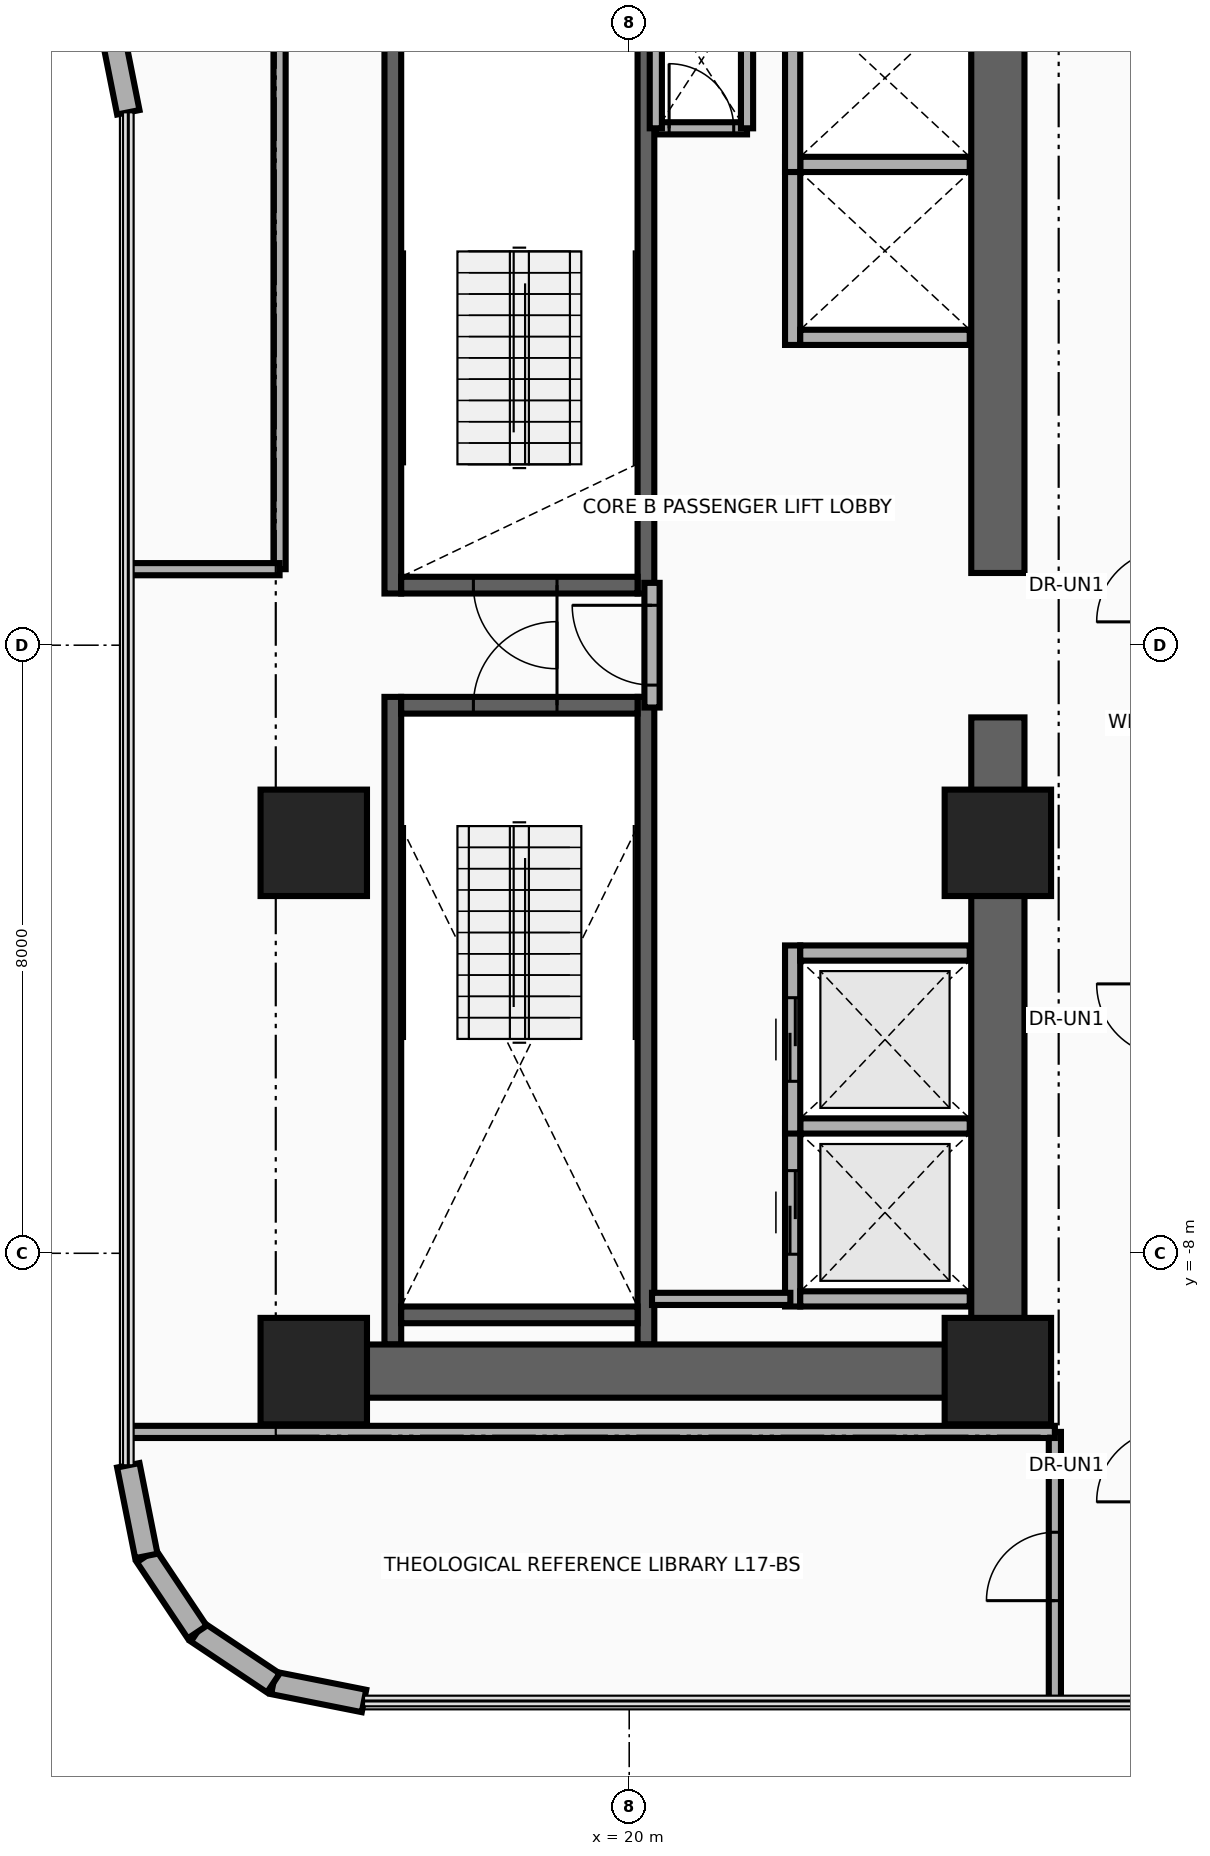
"""IFC4 building model, lengths in metres.
Left out: names, types, materials, properties, quantities, classifications, styles, units other than length and angle.
Written with IfcOpenShell. Run it as: python <this file> out.ifc"""

import sys

from ifc_helpers import new_model, si_unit, direction, frame, frame_2d, origin, origin_2d, place, context, subcontext, project, spatial, rectangle, extrude, source, transform, mapped, element, fill, save


model = new_model("IFC4")
c1 = context("Model", 3, precision=1e-05, world=origin(), true_north=direction((0.0, 1.0)))
c2 = subcontext(c1, "Body", "Model", "MODEL_VIEW")
j1 = project(units=[si_unit("LENGTHUNIT", "METRE"), si_unit("PLANEANGLEUNIT", "RADIAN")], contexts=[c1])
p1 = place(None, origin())
s1 = spatial("IfcSite", under=j1, at=p1, CompositionType="ELEMENT")
p2 = place(p1, origin())
s2 = spatial("IfcBuilding", under=s1, at=p2, CompositionType="ELEMENT")
p3 = place(p2, frame((0.0, 0.0, 70.4)))
s3 = spatial("IfcBuildingStorey", under=s2, at=p3, CompositionType="ELEMENT", Elevation=70.4)
for number, where, z_axis, x_axis in (
    (1, (16.89, 0.68, 0.0), (0.0, 0.0, 1.0), (0.0, 1.0, 0.0)),
    (2, (20.22, 0.68, 0.0), (0.0, 0.0, 1.0), (0.0, 1.0, 0.0)),
):
    element("IfcWall", number, at=place(p3, frame(where, z_axis=z_axis, x_axis=x_axis)), inside=s3, PredefinedType="SHEAR", context=c2, shape_type="SweptSolid", body=[
        extrude(rectangle(XDim=8.52, YDim=0.22, at=frame_2d((4.26, 0.0))), origin(), (0.0, 0.0, 1.0), 3.46),
    ])
p4 = place(p3, frame((17.0, 0.79, 0.0), z_axis=(0.0, 0.0, 1.0), x_axis=(1.0, 0.0, 0.0)))
e3 = element("IfcWall", 3, at=p4, inside=s3, PredefinedType="SHEAR", context=c2, shape_type="SweptSolid", body=[
    extrude(rectangle(XDim=3.11, YDim=0.22, at=frame_2d((1.555, 0.0))), origin(), (0.0, 0.0, 1.0), 3.46),
])
p5 = place(p4, frame((0.95, 0.0, 0.0)))
e4 = element("IfcOpeningElement", 4, at=p5, cuts=e3, PredefinedType="OPENING", context=c2, shape_type="SweptSolid", body=[
    extrude(rectangle(XDim=1.1, YDim=2.15, at=frame_2d((0.55, 1.075))), frame((0.0, 0.125, 0.0), z_axis=(0.0, -1.0, 0.0), x_axis=(1.0, 0.0, 0.0)), (0.0, 0.0, 1.0), 0.25),
])
for number, where, z_axis, x_axis in (
    (5, (16.89, -9.2, 0.0), (0.0, 0.0, 1.0), (0.0, 1.0, 0.0)),
    (6, (20.22, -9.2, 0.0), (0.0, 0.0, 1.0), (0.0, 1.0, 0.0)),
):
    element("IfcWall", number, at=place(p3, frame(where, z_axis=z_axis, x_axis=x_axis)), inside=s3, PredefinedType="SHEAR", context=c2, shape_type="SweptSolid", body=[
        extrude(rectangle(XDim=8.52, YDim=0.22, at=frame_2d((4.26, 0.0))), origin(), (0.0, 0.0, 1.0), 3.46),
    ])
p6 = place(p3, frame((17.0, -8.81, 0.0), z_axis=(0.0, 0.0, 1.0), x_axis=(1.0, 0.0, 0.0)))
e7 = element("IfcWall", 7, at=p6, inside=s3, PredefinedType="SHEAR", context=c2, shape_type="SweptSolid", body=[
    extrude(rectangle(XDim=3.11, YDim=0.22, at=frame_2d((1.555, 0.0))), origin(), (0.0, 0.0, 1.0), 3.46),
])
p7 = place(p3, frame((17.0, -0.79, 0.0), z_axis=(0.0, 0.0, 1.0), x_axis=(1.0, 0.0, 0.0)))
e8 = element("IfcWall", 8, at=p7, inside=s3, PredefinedType="SHEAR", context=c2, shape_type="SweptSolid", body=[
    extrude(rectangle(XDim=3.11, YDim=0.22, at=frame_2d((1.555, 0.0))), origin(), (0.0, 0.0, 1.0), 3.46),
])
p8 = place(p7, frame((0.95, 0.0, 0.0)))
e9 = element("IfcOpeningElement", 9, at=p8, cuts=e8, PredefinedType="OPENING", context=c2, shape_type="SweptSolid", body=[
    extrude(rectangle(XDim=1.1, YDim=2.15, at=frame_2d((0.55, 1.075))), frame((0.0, 0.125, 0.0), z_axis=(0.0, -1.0, 0.0), x_axis=(1.0, 0.0, 0.0)), (0.0, 0.0, 1.0), 0.25),
])
for number, where, z_axis, x_axis in (
    (10, (24.85, -9.9, 0.0), (0.0, 0.0, 1.0), (0.0, 1.0, 0.0)),
    (11, (24.85, 0.95, 0.0), (0.0, 0.0, 1.0), (0.0, 1.0, 0.0)),
):
    element("IfcWall", number, at=place(p3, frame(where, z_axis=z_axis, x_axis=x_axis)), inside=s3, PredefinedType="SHEAR", context=c2, shape_type="SweptSolid", body=[
        extrude(rectangle(XDim=8.95, YDim=0.7, at=frame_2d((4.475, 0.0))), origin(), (0.0, 0.0, 1.0), 3.46),
    ])
p9 = place(p3, frame((15.85, -9.55, 0.0), z_axis=(0.0, 0.0, 1.0), x_axis=(1.0, 0.0, 0.0)))
e12 = element("IfcWall", 12, at=p9, inside=s3, PredefinedType="SHEAR", context=c2, shape_type="SweptSolid", body=[
    extrude(rectangle(XDim=9.0, YDim=0.7, at=frame_2d((4.5, 0.0))), origin(), (0.0, 0.0, 1.0), 3.46),
])
m1 = source(origin(), c2, "Body", "SweptSolid", [
    extrude(rectangle(XDim=1.4, YDim=1.4, at=origin_2d()), origin(), (0.0, 0.0, 1.0), 3.7),
])
for number, where, z_axis, x_axis in (
    (13, (15.85, -9.55, 0.0), (0.0, 0.0, 1.0), (1.0, 0.0, 0.0)),
    (14, (24.85, -9.55, 0.0), (0.0, 0.0, 1.0), (1.0, 0.0, 0.0)),
    (15, (15.85, -2.6, 0.0), (0.0, 0.0, 1.0), (1.0, 0.0, 0.0)),
    (16, (24.85, -2.6, 0.0), (0.0, 0.0, 1.0), (1.0, 0.0, 0.0)),
):
    element("IfcColumn", number, at=place(p3, frame(where, z_axis=z_axis, x_axis=x_axis)), inside=s3, PredefinedType="COLUMN", context=c2, shape_type="MappedRepresentation", body=[
        mapped(m1, transform((0.0, 0.0, 0.0), x_axis=(1.0, 0.0, 0.0), y_axis=(0.0, 1.0, 0.0), z_axis=(0.0, 0.0, 1.0), scale=1.0)),
    ])
p10 = place(p3, frame((16.511, -13.89, 0.0), z_axis=(0.0, 0.0, 1.0), x_axis=(-0.980804027463, 0.194996050505, 0.0)))
e17 = element("IfcWall", 17, at=p10, inside=s3, PredefinedType="SOLIDWALL", context=c2, shape_type="SweptSolid", body=[
    extrude(rectangle(XDim=1.216, YDim=0.3, at=frame_2d((0.608, 0.0))), origin(), (0.0, 0.0, 1.0), 3.46),
])
for number, where, z_axis, x_axis in (
    (18, (15.318, -13.653, 0.0), (0.0, 0.0, 1.0), (-0.831, 0.556, 0.0)),
    (19, (14.317, -12.983, 0.0), (0.0, 0.0, 1.0), (-0.556, 0.831, 0.0)),
):
    element("IfcWall", number, at=place(p3, frame(where, z_axis=z_axis, x_axis=x_axis)), inside=s3, PredefinedType="SOLIDWALL", context=c2, shape_type="SweptSolid", body=[
        extrude(rectangle(XDim=1.205, YDim=0.3, at=frame_2d((0.603, 0.0))), origin(), (0.0, 0.0, 1.0), 3.46),
    ])
p11 = place(p3, frame((13.647, -11.982, 0.0), z_axis=(0.0, 0.0, 1.0), x_axis=(-0.195189223115, 0.980765602568, 0.0)))
e20 = element("IfcWall", 20, at=p11, inside=s3, PredefinedType="SOLIDWALL", context=c2, shape_type="SweptSolid", body=[
    extrude(rectangle(XDim=1.216, YDim=0.3, at=frame_2d((0.608, 0.0))), origin(), (0.0, 0.0, 1.0), 3.46),
])
p12 = place(p3, frame((13.41, 7.011, 0.0), z_axis=(0.0, 0.0, 1.0), x_axis=(-0.195090163074, 0.980785312019, 0.0)))
e21 = element("IfcWall", 21, at=p12, inside=s3, PredefinedType="SOLIDWALL", context=c2, shape_type="SweptSolid", body=[
    extrude(rectangle(XDim=1.281, YDim=0.3, at=frame_2d((0.641, 0.0))), origin(), (0.0, 0.0, 1.0), 3.46),
])
p13 = place(p3, frame((22.15, -8.7, 0.0), z_axis=(0.0, 0.0, 1.0), x_axis=(0.0, 1.0, 0.0)))
e22 = element("IfcWall", 22, at=p13, inside=s3, PredefinedType="MOVABLE", context=c2, shape_type="SweptSolid", body=[
    extrude(rectangle(XDim=2.475, YDim=0.2, at=frame_2d((1.237, 0.0))), origin(), (0.0, 0.0, 1.0), 3.46),
])
p14 = place(p13, frame((0.688, 0.0, 0.0)))
e23 = element("IfcOpeningElement", 23, at=p14, cuts=e22, PredefinedType="OPENING", context=c2, shape_type="SweptSolid", body=[
    extrude(rectangle(XDim=1.1, YDim=2.1, at=frame_2d((0.55, 1.05))), frame((0.0, 0.115, 0.0), z_axis=(0.0, -1.0, 0.0), x_axis=(1.0, 0.0, 0.0)), (0.0, 0.0, 1.0), 0.23),
])
for number, where, z_axis, x_axis in (
    (24, (22.25, -8.6, 0.0), (0.0, 0.0, 1.0), (1.0, 0.0, 0.0)),
    (25, (22.25, -6.325, 0.0), (0.0, 0.0, 1.0), (1.0, 0.0, 0.0)),
):
    element("IfcWall", number, at=place(p3, frame(where, z_axis=z_axis, x_axis=x_axis)), inside=s3, PredefinedType="MOVABLE", context=c2, shape_type="SweptSolid", body=[
        extrude(rectangle(XDim=2.23, YDim=0.2, at=frame_2d((1.115, 0.0))), origin(), (0.0, 0.0, 1.0), 3.46),
    ])
p15 = place(p3, frame((22.15, -6.425, 0.0), z_axis=(0.0, 0.0, 1.0), x_axis=(0.0, 1.0, 0.0)))
e26 = element("IfcWall", 26, at=p15, inside=s3, PredefinedType="MOVABLE", context=c2, shape_type="SweptSolid", body=[
    extrude(rectangle(XDim=2.475, YDim=0.2, at=frame_2d((1.238, 0.0))), origin(), (0.0, 0.0, 1.0), 3.46),
])
p16 = place(p15, frame((0.688, 0.0, 0.0)))
e27 = element("IfcOpeningElement", 27, at=p16, cuts=e26, PredefinedType="OPENING", context=c2, shape_type="SweptSolid", body=[
    extrude(rectangle(XDim=1.1, YDim=2.1, at=frame_2d((0.55, 1.05))), frame((0.0, 0.115, 0.0), z_axis=(0.0, -1.0, 0.0), x_axis=(1.0, 0.0, 0.0)), (0.0, 0.0, 1.0), 0.23),
])
p17 = place(p3, frame((22.25, -4.05, 0.0), z_axis=(0.0, 0.0, 1.0), x_axis=(1.0, 0.0, 0.0)))
e28 = element("IfcWall", 28, at=p17, inside=s3, PredefinedType="MOVABLE", context=c2, shape_type="SweptSolid", body=[
    extrude(rectangle(XDim=2.23, YDim=0.2, at=frame_2d((1.115, 0.0))), origin(), (0.0, 0.0, 1.0), 3.46),
])
p18 = place(p3, frame((22.15, 3.95, 0.0), z_axis=(0.0, 0.0, 1.0), x_axis=(0.0, 1.0, 0.0)))
e29 = element("IfcWall", 29, at=p18, inside=s3, PredefinedType="MOVABLE", context=c2, shape_type="SweptSolid", body=[
    extrude(rectangle(XDim=2.475, YDim=0.2, at=frame_2d((1.238, 0.0))), origin(), (0.0, 0.0, 1.0), 3.46),
])
for number, where, z_axis, x_axis in (
    (30, (22.25, 4.05, 0.0), (0.0, 0.0, 1.0), (1.0, 0.0, 0.0)),
    (31, (22.25, 6.325, 0.0), (0.0, 0.0, 1.0), (1.0, 0.0, 0.0)),
):
    element("IfcWall", number, at=place(p3, frame(where, z_axis=z_axis, x_axis=x_axis)), inside=s3, PredefinedType="MOVABLE", context=c2, shape_type="SweptSolid", body=[
        extrude(rectangle(XDim=2.23, YDim=0.2, at=frame_2d((1.115, 0.0))), origin(), (0.0, 0.0, 1.0), 2.245),
    ])
p19 = place(p3, frame((22.15, 6.225, 0.0), z_axis=(0.0, 0.0, 1.0), x_axis=(0.0, 1.0, 0.0)))
e32 = element("IfcWall", 32, at=p19, inside=s3, PredefinedType="MOVABLE", context=c2, shape_type="SweptSolid", body=[
    extrude(rectangle(XDim=2.475, YDim=0.2, at=frame_2d((1.237, 0.0))), origin(), (0.0, 0.0, 1.0), 3.46),
])
p20 = place(p3, frame((20.3, -0.82, 0.0), z_axis=(0.0, 0.0, 1.0), x_axis=(0.0, 1.0, 0.0)))
e33 = element("IfcWall", 33, at=p20, inside=s3, PredefinedType="PARTITIONING", context=c2, shape_type="SweptSolid", body=[
    extrude(rectangle(XDim=1.64, YDim=0.2, at=frame_2d((0.82, 0.0))), origin(), (0.0, 0.0, 1.0), 3.46),
])
p21 = place(p20, frame((0.295, 0.0, 0.0)))
e34 = element("IfcOpeningElement", 34, at=p21, cuts=e33, PredefinedType="OPENING", context=c2, shape_type="SweptSolid", body=[
    extrude(rectangle(XDim=1.05, YDim=2.15, at=frame_2d((0.525, 1.075))), frame((0.0, 0.115, 0.0), z_axis=(0.0, -1.0, 0.0), x_axis=(1.0, 0.0, 0.0)), (0.0, 0.0, 1.0), 0.23),
])
p22 = place(p3, frame((20.35, 6.8, 0.0), z_axis=(0.0, 0.0, 1.0), x_axis=(1.0, 0.0, 0.0)))
e35 = element("IfcWall", 35, at=p22, inside=s3, PredefinedType="PARTITIONING", context=c2, shape_type="SweptSolid", body=[
    extrude(rectangle(XDim=1.2, YDim=0.16, at=frame_2d((0.6, 0.0))), origin(), (0.0, 0.0, 1.0), 3.46),
])
p23 = place(p22, frame((0.175, 0.0, 0.0)))
e36 = element("IfcOpeningElement", 36, at=p23, cuts=e35, PredefinedType="OPENING", context=c2, shape_type="SweptSolid", body=[
    extrude(rectangle(XDim=0.85, YDim=2.05, at=frame_2d((0.425, 1.025))), frame((0.0, 0.095, 0.0), z_axis=(0.0, -1.0, 0.0), x_axis=(1.0, 0.0, 0.0)), (0.0, 0.0, 1.0), 0.19),
])
for number, where, z_axis, x_axis in (
    (37, (21.55, 6.8, 0.0), (0.0, 0.0, 1.0), (0.0, 1.0, 0.0)),
    (38, (20.35, 6.8, 0.0), (0.0, 0.0, 1.0), (0.0, 1.0, 0.0)),
):
    element("IfcWall", number, at=place(p3, frame(where, z_axis=z_axis, x_axis=x_axis)), inside=s3, PredefinedType="PARTITIONING", context=c2, shape_type="SweptSolid", body=[
        extrude(rectangle(XDim=1.8, YDim=0.16, at=frame_2d((0.9, 0.0))), origin(), (0.0, 0.0, 1.0), 3.46),
    ])
p24 = place(p3, frame((20.3, -8.6, 0.0), z_axis=(0.0, 0.0, 1.0), x_axis=(1.0, 0.0, 0.0)))
e39 = element("IfcWall", 39, at=p24, inside=s3, PredefinedType="PARTITIONING", context=c2, shape_type="SweptSolid", body=[
    extrude(rectangle(XDim=1.82, YDim=0.16, at=frame_2d((0.91, 0.0))), origin(), (0.0, 0.0, 1.0), 3.46),
])
p25 = place(p3, frame((25.6, -13.89, 0.0), z_axis=(0.0, 0.0, 1.0), x_axis=(0.0, 1.0, 0.0)))
e40 = element("IfcWall", 40, at=p25, inside=s3, PredefinedType="PARTITIONING", context=c2, shape_type="SweptSolid", body=[
    extrude(rectangle(XDim=3.54, YDim=0.16, at=frame_2d((1.77, 0.0))), origin(), (0.0, 0.0, 1.0), 3.46),
])
p26 = place(p25, frame((1.32, 0.0, 0.0)))
e41 = element("IfcOpeningElement", 41, at=p26, cuts=e40, PredefinedType="OPENING", context=c2, shape_type="SweptSolid", body=[
    extrude(rectangle(XDim=0.9, YDim=2.1, at=frame_2d((0.45, 1.05))), frame((0.0, 0.095, 0.0), z_axis=(0.0, -1.0, 0.0), x_axis=(1.0, 0.0, 0.0)), (0.0, 0.0, 1.0), 0.19),
])
p27 = place(p3, frame((13.41, -10.35, 0.0), z_axis=(0.0, 0.0, 1.0), x_axis=(1.0, 0.0, 0.0)))
e42 = element("IfcWall", 42, at=p27, inside=s3, PredefinedType="PARTITIONING", context=c2, shape_type="SweptSolid", body=[
    extrude(rectangle(XDim=12.19, YDim=0.16, at=frame_2d((6.095, 0.0))), origin(), (0.0, 0.0, 1.0), 3.46),
])
p28 = place(p3, frame((15.4, 1.0, 0.0), z_axis=(0.0, 0.0, 1.0), x_axis=(0.0, 1.0, 0.0)))
e43 = element("IfcWall", 43, at=p28, inside=s3, PredefinedType="PARTITIONING", context=c2, shape_type="SweptSolid", body=[
    extrude(rectangle(XDim=9.35, YDim=0.16, at=frame_2d((4.675, 0.0))), origin(), (0.0, 0.0, 1.0), 2.245),
])
p29 = place(p3, frame((13.41, 1.0, 0.0), z_axis=(0.0, 0.0, 1.0), x_axis=(1.0, 0.0, 0.0)))
e44 = element("IfcWall", 44, at=p29, inside=s3, PredefinedType="PARTITIONING", context=c2, shape_type="SweptSolid", body=[
    extrude(rectangle(XDim=1.99, YDim=0.16, at=frame_2d((0.995, 0.0))), origin(), (0.0, 0.0, 1.0), 2.245),
])
p30 = place(p14, origin())
e45 = element("IfcDoor", 45, at=p30, inside=s3, OperationType="DOUBLE_DOOR_SLIDING", PredefinedType="DOOR", context=c2, shape_type="SweptSolid", body=[
    extrude(rectangle(XDim=1.1, YDim=2.1, at=frame_2d((0.55, 1.05))), frame((0.0, 0.025, 0.0), z_axis=(0.0, -1.0, 0.0), x_axis=(1.0, 0.0, 0.0)), (0.0, 0.0, 1.0), 0.05),
])
fill(e23, e45)
p31 = place(p16, origin())
e46 = element("IfcDoor", 46, at=p31, inside=s3, OperationType="DOUBLE_DOOR_SLIDING", PredefinedType="DOOR", context=c2, shape_type="SweptSolid", body=[
    extrude(rectangle(XDim=1.1, YDim=2.1, at=frame_2d((0.55, 1.05))), frame((0.0, 0.025, 0.0), z_axis=(0.0, -1.0, 0.0), x_axis=(1.0, 0.0, 0.0)), (0.0, 0.0, 1.0), 0.05),
])
fill(e27, e46)
p32 = place(p21, origin())
e47 = element("IfcDoor", 47, at=p32, inside=s3, OperationType="SINGLE_SWING_RIGHT", PredefinedType="DOOR", context=c2, shape_type="SweptSolid", body=[
    extrude(rectangle(XDim=1.05, YDim=2.15, at=frame_2d((0.525, 1.075))), frame((0.0, 0.025, 0.0), z_axis=(0.0, -1.0, 0.0), x_axis=(1.0, 0.0, 0.0)), (0.0, 0.0, 1.0), 0.05),
])
fill(e34, e47)
p33 = place(p5, frame((1.1, 0.0, 0.0), z_axis=(0.0, 0.0, 1.0), x_axis=(-1.0, 0.0, 0.0)))
e48 = element("IfcDoor", 48, at=p33, inside=s3, OperationType="SINGLE_SWING_LEFT", PredefinedType="DOOR", context=c2, shape_type="SweptSolid", body=[
    extrude(rectangle(XDim=1.1, YDim=2.15, at=frame_2d((0.55, 1.075))), frame((0.0, 0.025, 0.0), z_axis=(0.0, -1.0, 0.0), x_axis=(1.0, 0.0, 0.0)), (0.0, 0.0, 1.0), 0.05),
])
fill(e4, e48)
p34 = place(p8, origin())
e49 = element("IfcDoor", 49, at=p34, inside=s3, OperationType="SINGLE_SWING_RIGHT", PredefinedType="DOOR", context=c2, shape_type="SweptSolid", body=[
    extrude(rectangle(XDim=1.1, YDim=2.15, at=frame_2d((0.55, 1.075))), frame((0.0, 0.025, 0.0), z_axis=(0.0, -1.0, 0.0), x_axis=(1.0, 0.0, 0.0)), (0.0, 0.0, 1.0), 0.05),
])
fill(e9, e49)
p35 = place(p23, origin())
e50 = element("IfcDoor", 50, at=p35, inside=s3, OperationType="SINGLE_SWING_LEFT", PredefinedType="DOOR", context=c2, shape_type="SweptSolid", body=[
    extrude(rectangle(XDim=0.85, YDim=2.05, at=frame_2d((0.425, 1.025))), frame((0.0, 0.025, 0.0), z_axis=(0.0, -1.0, 0.0), x_axis=(1.0, 0.0, 0.0)), (0.0, 0.0, 1.0), 0.05),
])
fill(e36, e50)
p36 = place(p26, origin())
e51 = element("IfcDoor", 51, at=p36, inside=s3, OperationType="SINGLE_SWING_RIGHT", PredefinedType="DOOR", context=c2, shape_type="SweptSolid", body=[
    extrude(rectangle(XDim=0.9, YDim=2.1, at=frame_2d((0.45, 1.05))), frame((0.0, 0.025, 0.0), z_axis=(0.0, -1.0, 0.0), x_axis=(1.0, 0.0, 0.0)), (0.0, 0.0, 1.0), 0.05),
])
fill(e41, e51)
save(model, sys.argv[1])
